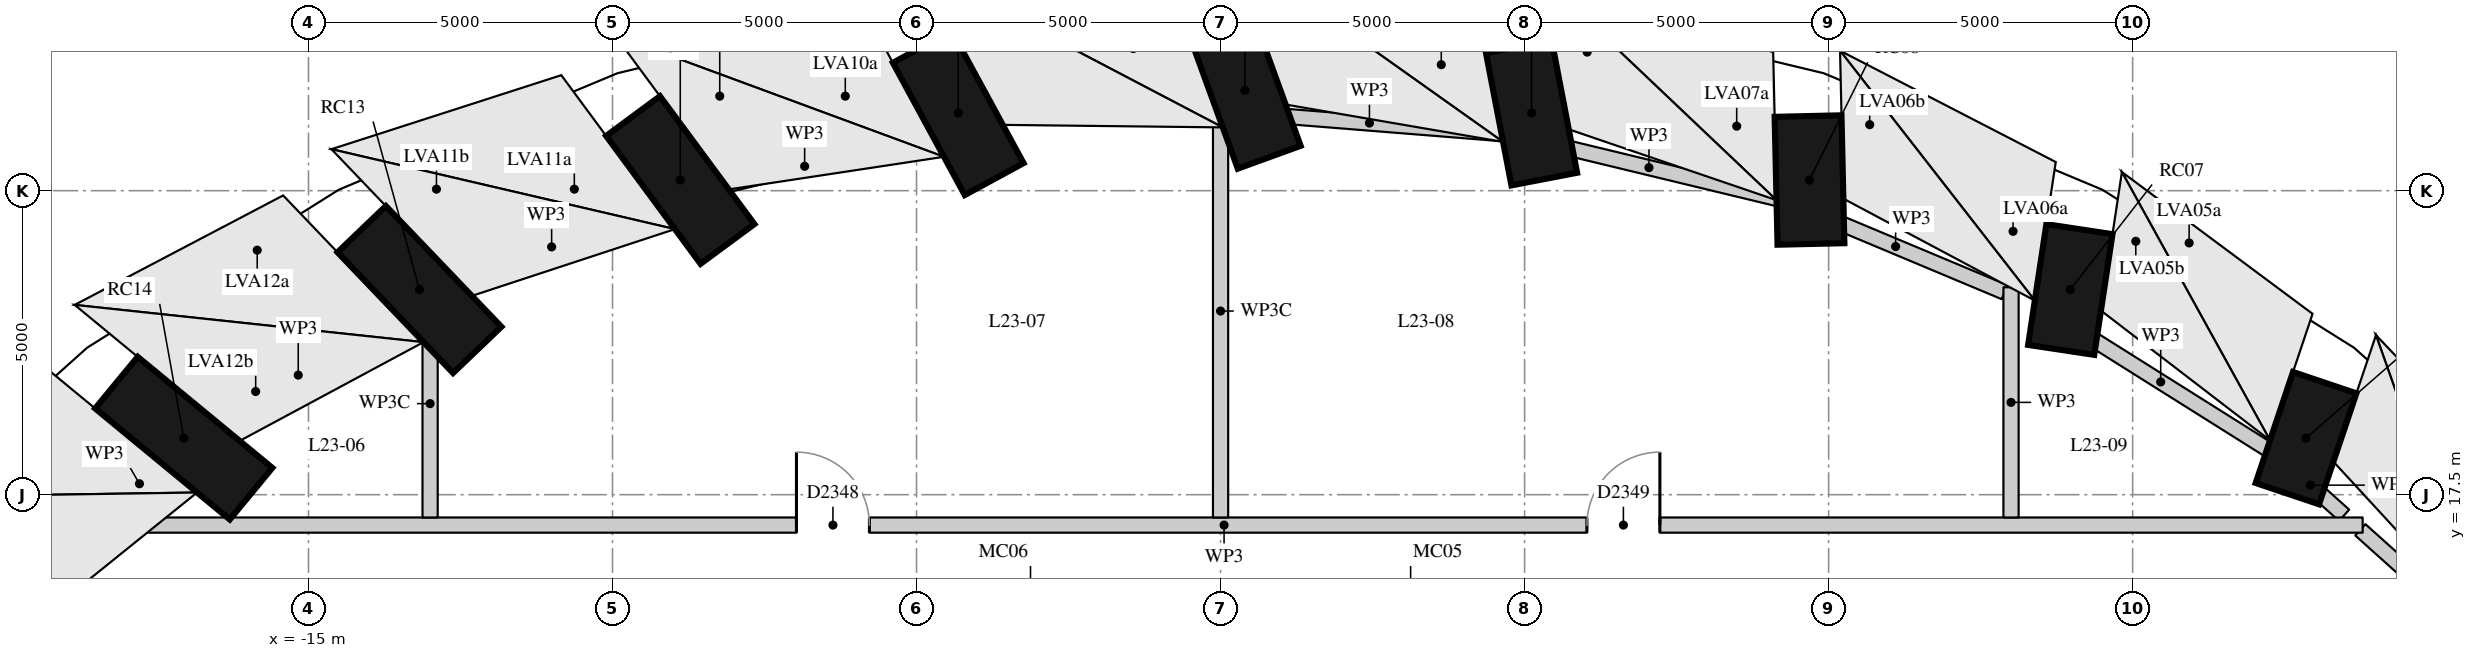
"""IFC4 building model, lengths in metres.
Left out: names, types, materials, properties, quantities, classifications, styles, units other than length and angle.
Written with IfcOpenShell. Run it as: python <this file> out.ifc"""

import sys

from ifc_helpers import new_model, si_unit, direction, frame, frame_2d, origin, origin_2d, place, context, subcontext, project, spatial, rectangle, extrude, element, fill, save


model = new_model("IFC4")
c1 = context("Model", 3, precision=1e-05, world=origin(), true_north=direction((0.0, 1.0)))
c2 = subcontext(c1, "Body", "Model", "MODEL_VIEW")
j1 = project(units=[si_unit("LENGTHUNIT", "METRE"), si_unit("PLANEANGLEUNIT", "RADIAN")], contexts=[c1])
p1 = place(None, origin())
s1 = spatial("IfcSite", under=j1, at=p1, CompositionType="ELEMENT")
p2 = place(p1, origin())
s2 = spatial("IfcBuilding", under=s1, at=p2, CompositionType="ELEMENT")
p3 = place(p2, frame((0.0, 0.0, 84.4)))
s3 = spatial("IfcBuildingStorey", under=s2, at=p3, CompositionType="ELEMENT", Elevation=84.4)
p4 = place(p3, frame((18.159, 19.343, 0.337), z_axis=(-0.143360529219, -0.426262440358, 0.893167448244), x_axis=(0.28471881473, 0.846571489681, 0.449724259294)))
e1 = element("IfcColumn", 1, at=p4, inside=s3, PredefinedType="COLUMN", context=c2, shape_type="SweptSolid", body=[
    extrude(rectangle(XDim=1.5, YDim=1.1, at=origin_2d()), origin(), (0.0, 0.0, 1.0), 4.283),
])
p5 = place(p3, frame((14.125, 21.867, 0.351), z_axis=(-0.069824941366, -0.462071804828, 0.88408943255), x_axis=(0.132097471979, 0.874164963061, 0.467317745494)))
e2 = element("IfcColumn", 2, at=p5, inside=s3, PredefinedType="COLUMN", context=c2, shape_type="SweptSolid", body=[
    extrude(rectangle(XDim=1.5, YDim=1.1, at=origin_2d()), origin(), (0.0, 0.0, 1.0), 4.297),
])
p6 = place(p3, frame((9.662, 23.727, 0.366), z_axis=(0.011029552025, -0.487336514068, 0.873144587705), x_axis=(-0.019756221577, 0.872921051841, 0.48746131022)))
e3 = element("IfcColumn", 3, at=p6, inside=s3, PredefinedType="COLUMN", context=c2, shape_type="SweptSolid", body=[
    extrude(rectangle(XDim=1.5, YDim=1.1, at=origin_2d()), origin(), (0.0, 0.0, 1.0), 4.316),
])
p7 = place(p3, frame((4.906, 24.866, 0.383), z_axis=(0.096253792996, -0.501059464472, 0.860043382858), x_axis=(-0.16224822563, 0.844600576413, 0.51022091255)))
e4 = element("IfcColumn", 4, at=p7, inside=s3, PredefinedType="COLUMN", context=c2, shape_type="SweptSolid", body=[
    extrude(rectangle(XDim=1.5, YDim=1.1, at=origin_2d()), origin(), (0.0, 0.0, 1.0), 4.342),
])
p8 = place(p3, frame((0.0, 25.25, 0.401), z_axis=(0.18281665418, -0.502703958137, 0.844906386192), x_axis=(-0.288762121798, 0.794029746573, 0.534914197392)))
e5 = element("IfcColumn", 5, at=p8, inside=s3, PredefinedType="COLUMN", context=c2, shape_type="SweptSolid", body=[
    extrude(rectangle(XDim=1.5, YDim=1.1, at=origin_2d()), origin(), (0.0, 0.0, 1.0), 4.376),
])
p9 = place(p3, frame((-4.906, 24.866, 0.42), z_axis=(0.267491573973, -0.492436460906, 0.828223755892), x_axis=(-0.395331630965, 0.727782585243, 0.560397546547)))
e6 = element("IfcColumn", 6, at=p9, inside=s3, PredefinedType="COLUMN", context=c2, shape_type="SweptSolid", body=[
    extrude(rectangle(XDim=1.5, YDim=1.1, at=origin_2d()), origin(), (0.0, 0.0, 1.0), 4.418),
])
p10 = place(p3, frame((-9.662, 23.727, 0.439), z_axis=(0.347528418549, -0.47087668725, 0.810863208997), x_axis=(-0.481511971374, 0.652415025217, 0.585235727117)))
e7 = element("IfcColumn", 7, at=p10, inside=s3, PredefinedType="COLUMN", context=c2, shape_type="SweptSolid", body=[
    extrude(rectangle(XDim=1.5, YDim=1.1, at=origin_2d()), origin(), (0.0, 0.0, 1.0), 4.467),
])
p11 = place(p3, frame((-14.125, 21.867, 0.456), z_axis=(0.420386102017, -0.439347233064, 0.793882569421), x_axis=(-0.548845681569, 0.573600864586, 0.608071102725)))
e8 = element("IfcColumn", 8, at=p11, inside=s3, PredefinedType="COLUMN", context=c2, shape_type="SweptSolid", body=[
    extrude(rectangle(XDim=1.5, YDim=1.1, at=origin_2d()), origin(), (0.0, 0.0, 1.0), 4.52),
])
p12 = place(p3, frame((-18.159, 19.343, 0.471), z_axis=(0.48434493808, -0.399374952802, 0.778401970726), x_axis=(-0.600566052476, 0.49520707249, 0.627766176191)))
e9 = element("IfcColumn", 9, at=p12, inside=s3, PredefinedType="COLUMN", context=c2, shape_type="SweptSolid", body=[
    extrude(rectangle(XDim=1.5, YDim=1.1, at=origin_2d()), origin(), (0.0, 0.0, 1.0), 4.571),
])
p13 = place(p3, frame((-21.641, 16.23, 0.483), z_axis=(0.538208092319, -0.352637325714, 0.765492629537), x_axis=(-0.640294887233, 0.419525235545, 0.64344466283)))
e10 = element("IfcColumn", 10, at=p13, inside=s3, PredefinedType="COLUMN", context=c2, shape_type="SweptSolid", body=[
    extrude(rectangle(XDim=1.5, YDim=1.1, at=origin_2d()), origin(), (0.0, 0.0, 1.0), 4.618),
])
p14 = place(p3, frame((-18.629, 16.923, 0.0), z_axis=(0.0, 0.0, 1.0), x_axis=(-0.745977283695, -0.665971389934, 0.0)))
e11 = element("IfcWall", 11, at=p14, inside=s3, PredefinedType="PARTITIONING", context=c2, shape_type="SweptSolid", body=[
    extrude(rectangle(XDim=2.514, YDim=0.25, at=frame_2d((1.257, 0.0))), origin(), (0.0, 0.0, 1.0), 4.22),
])
p15 = place(p3, frame((20.665, 15.199, 0.0), z_axis=(0.0, 0.0, 1.0), x_axis=(-0.744342369602, 0.667798200668, 0.0)))
e12 = element("IfcWall", 12, at=p15, inside=s3, PredefinedType="PARTITIONING", context=c2, shape_type="SweptSolid", body=[
    extrude(rectangle(XDim=2.58, YDim=0.25, at=frame_2d((1.29, 0.0))), origin(), (0.0, 0.0, 1.0), 4.22),
])
p16 = place(p3, frame((-17.199, 18.198, 0.0), z_axis=(0.0, 0.0, 1.0), x_axis=(-0.746040610703, -0.665900448402, 0.0)))
e13 = element("IfcWall", 13, at=p16, inside=s3, PredefinedType="PARTITIONING", context=c2, shape_type="SweptSolid", body=[
    extrude(rectangle(XDim=1.557, YDim=0.25, at=frame_2d((0.778, 0.0))), origin(), (0.0, 0.0, 1.0), 4.22),
])
p17 = place(p3, frame((-13.137, 20.735, 0.0), z_axis=(0.0, 0.0, 1.0), x_axis=(-0.848198724943, -0.529678131515, 0.0)))
e14 = element("IfcWall", 14, at=p17, inside=s3, PredefinedType="PARTITIONING", context=c2, shape_type="SweptSolid", body=[
    extrude(rectangle(XDim=4.789, YDim=0.25, at=frame_2d((2.395, 0.0))), origin(), (0.0, 0.0, 1.0), 4.22),
])
p18 = place(p3, frame((-9.108, 22.362, 0.0), z_axis=(0.0, 0.0, 1.0), x_axis=(-0.923539545344, -0.383503204923, 0.0)))
e15 = element("IfcWall", 15, at=p18, inside=s3, PredefinedType="PARTITIONING", context=c2, shape_type="SweptSolid", body=[
    extrude(rectangle(XDim=4.1, YDim=0.25, at=frame_2d((2.05, 0.0))), origin(), (0.0, 0.0, 1.0), 4.22),
])
p19 = place(p3, frame((-4.573, 23.441, 0.0), z_axis=(0.0, 0.0, 1.0), x_axis=(-0.972804528966, -0.231627607214, 0.0)))
e16 = element("IfcWall", 16, at=p19, inside=s3, PredefinedType="PARTITIONING", context=c2, shape_type="SweptSolid", body=[
    extrude(rectangle(XDim=4.662, YDim=0.25, at=frame_2d((2.331, 0.0))), origin(), (0.0, 0.0, 1.0), 4.22),
])
p20 = place(p3, frame((4.781, 23.426, 0.0), z_axis=(0.0, 0.0, 1.0), x_axis=(-0.996822406817, 0.079656068617, 0.0)))
e17 = element("IfcWall", 17, at=p20, inside=s3, PredefinedType="PARTITIONING", context=c2, shape_type="SweptSolid", body=[
    extrude(rectangle(XDim=4.68, YDim=0.25, at=frame_2d((2.34, 0.0))), origin(), (0.0, 0.0, 1.0), 4.22),
])
p21 = place(p3, frame((9.31, 22.333, 0.0), z_axis=(0.0, 0.0, 1.0), x_axis=(-0.972086330275, 0.234623456825, 0.0)))
e18 = element("IfcWall", 18, at=p21, inside=s3, PredefinedType="PARTITIONING", context=c2, shape_type="SweptSolid", body=[
    extrude(rectangle(XDim=4.659, YDim=0.25, at=frame_2d((2.329, 0.0))), origin(), (0.0, 0.0, 1.0), 4.22),
])
p22 = place(p3, frame((12.895, 20.831, 0.0), z_axis=(0.0, 0.0, 1.0), x_axis=(-0.922311392855, 0.386447531511, 0.0)))
e19 = element("IfcWall", 19, at=p22, inside=s3, PredefinedType="PARTITIONING", context=c2, shape_type="SweptSolid", body=[
    extrude(rectangle(XDim=3.887, YDim=0.25, at=frame_2d((1.944, 0.0))), origin(), (0.0, 0.0, 1.0), 4.22),
])
p23 = place(p3, frame((17.373, 18.153, 0.0), z_axis=(0.0, 0.0, 1.0), x_axis=(-0.846592001296, 0.532242410318, 0.0)))
e20 = element("IfcWall", 20, at=p23, inside=s3, PredefinedType="PARTITIONING", context=c2, shape_type="SweptSolid", body=[
    extrude(rectangle(XDim=4.515, YDim=0.25, at=frame_2d((2.258, 0.0))), origin(), (0.0, 0.0, 1.0), 4.22),
])
p24 = place(p3, frame((18.478, 17.161, 0.0), z_axis=(0.0, 0.0, 1.0), x_axis=(-0.744315658598, 0.667827972135, 0.0)))
e21 = element("IfcWall", 21, at=p24, inside=s3, PredefinedType="PARTITIONING", context=c2, shape_type="SweptSolid", body=[
    extrude(rectangle(XDim=1.484, YDim=0.25, at=frame_2d((0.742, 0.0))), origin(), (0.0, 0.0, 1.0), 4.22),
])
p25 = place(p3, frame((-18.667, 17.0, 0.0), z_axis=(0.0, 0.0, 1.0), x_axis=(1.0, 0.0, 0.0)))
e22 = element("IfcWall", 22, at=p25, inside=s3, PredefinedType="PARTITIONING", context=c2, shape_type="SweptSolid", body=[
    extrude(rectangle(XDim=37.45, YDim=0.25, at=frame_2d((18.725, 0.0))), origin(), (0.0, 0.0, 1.0), 4.22),
])
p26 = place(p25, frame((11.692, 0.0, 0.0)))
e23 = element("IfcOpeningElement", 23, at=p26, cuts=e22, PredefinedType="OPENING", context=c2, shape_type="SweptSolid", body=[
    extrude(rectangle(XDim=1.2, YDim=2.1, at=frame_2d((0.6, 1.05))), frame((0.0, 0.135, 0.0), z_axis=(0.0, -1.0, 0.0), x_axis=(1.0, 0.0, 0.0)), (0.0, 0.0, 1.0), 0.27),
])
p27 = place(p25, frame((24.692, 0.0, 0.0)))
e24 = element("IfcOpeningElement", 24, at=p27, cuts=e22, PredefinedType="OPENING", context=c2, shape_type="SweptSolid", body=[
    extrude(rectangle(XDim=1.2, YDim=2.1, at=frame_2d((0.6, 1.05))), frame((0.0, 0.135, 0.0), z_axis=(0.0, -1.0, 0.0), x_axis=(1.0, 0.0, 0.0)), (0.0, 0.0, 1.0), 0.27),
])
p28 = place(p3, frame((-13.0, 17.125, 0.0), z_axis=(0.0, 0.0, 1.0), x_axis=(0.0, 1.0, 0.0)))
e25 = element("IfcWall", 25, at=p28, inside=s3, PredefinedType="PARTITIONING", context=c2, shape_type="SweptSolid", body=[
    extrude(rectangle(XDim=3.745, YDim=0.25, at=frame_2d((1.873, 0.0))), origin(), (0.0, 0.0, 1.0), 3.77),
])
p29 = place(p3, frame((0.0, 17.125, 0.0), z_axis=(0.0, 0.0, 1.0), x_axis=(0.0, 1.0, 0.0)))
e26 = element("IfcWall", 26, at=p29, inside=s3, PredefinedType="PARTITIONING", context=c2, shape_type="SweptSolid", body=[
    extrude(rectangle(XDim=6.792, YDim=0.25, at=frame_2d((3.396, 0.0))), origin(), (0.0, 0.0, 1.0), 3.77),
])
p30 = place(p3, frame((13.0, 17.125, 0.0), z_axis=(0.0, 0.0, 1.0), x_axis=(0.0, 1.0, 0.0)))
e27 = element("IfcWall", 27, at=p30, inside=s3, PredefinedType="PARTITIONING", context=c2, shape_type="SweptSolid", body=[
    extrude(rectangle(XDim=3.787, YDim=0.25, at=frame_2d((1.893, 0.0))), origin(), (0.0, 0.0, 1.0), 4.22),
])
p31 = place(p26, origin())
e28 = element("IfcDoor", 28, at=p31, inside=s3, OperationType="SINGLE_SWING_LEFT", PredefinedType="DOOR", context=c2, shape_type="SweptSolid", body=[
    extrude(rectangle(XDim=1.2, YDim=2.1, at=frame_2d((0.6, 1.05))), frame((0.0, 0.025, 0.0), z_axis=(0.0, -1.0, 0.0), x_axis=(1.0, 0.0, 0.0)), (0.0, 0.0, 1.0), 0.05),
])
fill(e23, e28)
p32 = place(p27, origin())
e29 = element("IfcDoor", 29, at=p32, inside=s3, OperationType="SINGLE_SWING_RIGHT", PredefinedType="DOOR", context=c2, shape_type="SweptSolid", body=[
    extrude(rectangle(XDim=1.2, YDim=2.1, at=frame_2d((0.6, 1.05))), frame((0.0, 0.025, 0.0), z_axis=(0.0, -1.0, 0.0), x_axis=(1.0, 0.0, 0.0)), (0.0, 0.0, 1.0), 0.05),
])
fill(e24, e29)
save(model, sys.argv[1])
